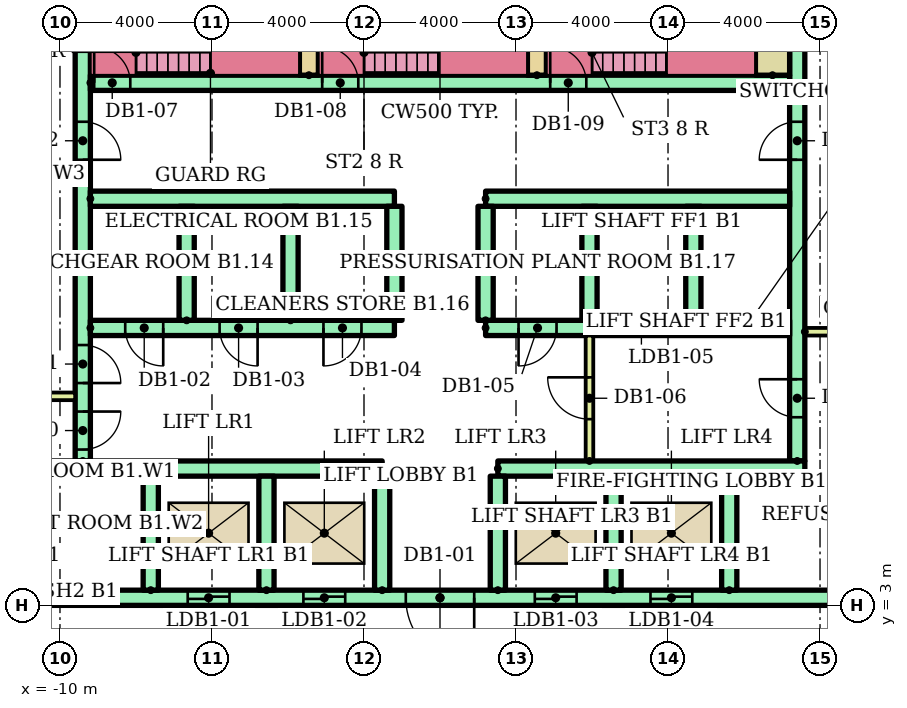
"""IFC4 building model, lengths in metres.
Left out: names, types, materials, properties, quantities, classifications, styles, units other than length and angle.
Written with IfcOpenShell. Run it as: python <this file> out.ifc"""

import sys

from ifc_helpers import new_model, si_unit, direction, frame, frame_2d, origin, place, context, subcontext, project, spatial, rectangle, extrude, element, fill, save


model = new_model("IFC4")
c1 = context("Model", 3, precision=1e-05, world=origin(), true_north=direction((0.0, 1.0)))
c2 = subcontext(c1, "Body", "Model", "MODEL_VIEW")
j1 = project(units=[si_unit("LENGTHUNIT", "METRE"), si_unit("PLANEANGLEUNIT", "RADIAN")], contexts=[c1])
p1 = place(None, origin())
s1 = spatial("IfcSite", under=j1, at=p1, CompositionType="ELEMENT")
p2 = place(p1, origin())
s2 = spatial("IfcBuilding", under=s1, at=p2, CompositionType="ELEMENT")
p3 = place(p2, frame((0.0, 0.0, -5.0)))
s3 = spatial("IfcBuildingStorey", under=s2, at=p3, CompositionType="ELEMENT", Elevation=-5.0)
p4 = place(p3, frame((-9.4, 6.8, 0.0), z_axis=(0.0, 0.0, 1.0), x_axis=(0.0, 1.0, 0.0)))
e1 = element("IfcWall", 1, at=p4, inside=s3, PredefinedType="SHEAR", context=c2, shape_type="SweptSolid", body=[
    extrude(rectangle(XDim=12.7, YDim=0.4, at=frame_2d((6.35, 0.0))), origin(), (0.0, 0.0, 1.0), 4.58),
])
p5 = place(p4, frame((0.3, 0.0, 0.0)))
e2 = element("IfcOpeningElement", 2, at=p5, cuts=e1, PredefinedType="OPENING", context=c2, shape_type="SweptSolid", body=[
    extrude(rectangle(XDim=1.0, YDim=2.1, at=frame_2d((0.5, 1.05))), frame((0.0, 0.21, 0.0), z_axis=(0.0, -1.0, 0.0), x_axis=(1.0, 0.0, 0.0)), (0.0, 0.0, 1.0), 0.42),
])
p6 = place(p4, frame((2.05, 0.0, 0.0)))
e3 = element("IfcOpeningElement", 3, at=p6, cuts=e1, PredefinedType="OPENING", context=c2, shape_type="SweptSolid", body=[
    extrude(rectangle(XDim=1.0, YDim=2.1, at=frame_2d((0.5, 1.05))), frame((0.0, 0.21, 0.0), z_axis=(0.0, -1.0, 0.0), x_axis=(1.0, 0.0, 0.0)), (0.0, 0.0, 1.0), 0.42),
])
p7 = place(p4, frame((7.925, 0.0, 0.0)))
e4 = element("IfcOpeningElement", 4, at=p7, cuts=e1, PredefinedType="OPENING", context=c2, shape_type="SweptSolid", body=[
    extrude(rectangle(XDim=1.0, YDim=2.1, at=frame_2d((0.5, 1.05))), frame((0.0, 0.21, 0.0), z_axis=(0.0, -1.0, 0.0), x_axis=(1.0, 0.0, 0.0)), (0.0, 0.0, 1.0), 0.42),
])
p8 = place(p3, frame((9.4, 6.8, 0.0), z_axis=(0.0, 0.0, 1.0), x_axis=(0.0, 1.0, 0.0)))
e5 = element("IfcWall", 5, at=p8, inside=s3, PredefinedType="SHEAR", context=c2, shape_type="SweptSolid", body=[
    extrude(rectangle(XDim=12.7, YDim=0.4, at=frame_2d((6.35, 0.0))), origin(), (0.0, 0.0, 1.0), 4.58),
])
p9 = place(p8, frame((1.15, 0.0, 0.0)))
e6 = element("IfcOpeningElement", 6, at=p9, cuts=e5, PredefinedType="OPENING", context=c2, shape_type="SweptSolid", body=[
    extrude(rectangle(XDim=1.0, YDim=2.1, at=frame_2d((0.5, 1.05))), frame((0.0, 0.21, 0.0), z_axis=(0.0, -1.0, 0.0), x_axis=(1.0, 0.0, 0.0)), (0.0, 0.0, 1.0), 0.42),
])
p10 = place(p8, frame((7.925, 0.0, 0.0)))
e7 = element("IfcOpeningElement", 7, at=p10, cuts=e5, PredefinedType="OPENING", context=c2, shape_type="SweptSolid", body=[
    extrude(rectangle(XDim=1.0, YDim=2.1, at=frame_2d((0.5, 1.05))), frame((0.0, 0.21, 0.0), z_axis=(0.0, -1.0, 0.0), x_axis=(1.0, 0.0, 0.0)), (0.0, 0.0, 1.0), 0.42),
])
p11 = place(p3, frame((-13.5, 3.2, 0.0)))
e8 = element("IfcWall", 8, at=p11, inside=s3, PredefinedType="SHEAR", context=c2, shape_type="SweptSolid", body=[
    extrude(rectangle(XDim=27.0, YDim=0.4, at=frame_2d((13.5, 0.0))), origin(), (0.0, 0.0, 1.0), 4.58),
])
p12 = place(p11, frame((6.861, 0.0, 0.0)))
e9 = element("IfcOpeningElement", 9, at=p12, cuts=e8, PredefinedType="OPENING", context=c2, shape_type="SweptSolid", body=[
    extrude(rectangle(XDim=1.1, YDim=2.1, at=frame_2d((0.55, 1.05))), frame((0.0, 0.21, 0.0), z_axis=(0.0, -1.0, 0.0), x_axis=(1.0, 0.0, 0.0)), (0.0, 0.0, 1.0), 0.42),
])
p13 = place(p11, frame((9.906, 0.0, 0.0)))
e10 = element("IfcOpeningElement", 10, at=p13, cuts=e8, PredefinedType="OPENING", context=c2, shape_type="SweptSolid", body=[
    extrude(rectangle(XDim=1.1, YDim=2.1, at=frame_2d((0.55, 1.05))), frame((0.0, 0.21, 0.0), z_axis=(0.0, -1.0, 0.0), x_axis=(1.0, 0.0, 0.0)), (0.0, 0.0, 1.0), 0.42),
])
p14 = place(p11, frame((15.994, 0.0, 0.0)))
e11 = element("IfcOpeningElement", 11, at=p14, cuts=e8, PredefinedType="OPENING", context=c2, shape_type="SweptSolid", body=[
    extrude(rectangle(XDim=1.1, YDim=2.1, at=frame_2d((0.55, 1.05))), frame((0.0, 0.21, 0.0), z_axis=(0.0, -1.0, 0.0), x_axis=(1.0, 0.0, 0.0)), (0.0, 0.0, 1.0), 0.42),
])
p15 = place(p11, frame((19.039, 0.0, 0.0)))
e12 = element("IfcOpeningElement", 12, at=p15, cuts=e8, PredefinedType="OPENING", context=c2, shape_type="SweptSolid", body=[
    extrude(rectangle(XDim=1.1, YDim=2.1, at=frame_2d((0.55, 1.05))), frame((0.0, 0.21, 0.0), z_axis=(0.0, -1.0, 0.0), x_axis=(1.0, 0.0, 0.0)), (0.0, 0.0, 1.0), 0.42),
])
p16 = place(p11, frame((12.6, 0.0, 0.0)))
e13 = element("IfcOpeningElement", 13, at=p16, cuts=e8, PredefinedType="OPENING", context=c2, shape_type="SweptSolid", body=[
    extrude(rectangle(XDim=1.8, YDim=2.1, at=frame_2d((0.9, 1.05))), frame((0.0, 0.21, 0.0), z_axis=(0.0, -1.0, 0.0), x_axis=(1.0, 0.0, 0.0)), (0.0, 0.0, 1.0), 0.42),
])
p17 = place(p3, frame((-13.5, 6.6, 0.0)))
e14 = element("IfcWall", 14, at=p17, inside=s3, PredefinedType="SHEAR", context=c2, shape_type="SweptSolid", body=[
    extrude(rectangle(XDim=11.978, YDim=0.4, at=frame_2d((5.989, 0.0))), origin(), (0.0, 0.0, 1.0), 4.58),
])
p18 = place(p3, frame((1.522, 6.6, 0.0)))
e15 = element("IfcWall", 15, at=p18, inside=s3, PredefinedType="SHEAR", context=c2, shape_type="SweptSolid", body=[
    extrude(rectangle(XDim=8.078, YDim=0.4, at=frame_2d((4.039, 0.0))), origin(), (0.0, 0.0, 1.0), 4.58),
])
for number, where, z_axis, x_axis in (
    (16, (-7.611, 3.4, 0.0), (0.0, 0.0, 1.0), (0.0, 1.0, 0.0)),
    (17, (-4.567, 3.4, 0.0), (0.0, 0.0, 1.0), (0.0, 1.0, 0.0)),
    (18, (-1.522, 3.4, 0.0), (0.0, 0.0, 1.0), (0.0, 1.0, 0.0)),
    (19, (1.522, 3.4, 0.0), (0.0, 0.0, 1.0), (0.0, 1.0, 0.0)),
    (20, (4.567, 3.4, 0.0), (0.0, 0.0, 1.0), (0.0, 1.0, 0.0)),
    (21, (7.611, 3.4, 0.0), (0.0, 0.0, 1.0), (0.0, 1.0, 0.0)),
):
    element("IfcWall", number, at=place(p3, frame(where, z_axis=z_axis, x_axis=x_axis)), inside=s3, PredefinedType="SHEAR", context=c2, shape_type="SweptSolid", body=[
        extrude(rectangle(XDim=3.0, YDim=0.4, at=frame_2d((1.5, 0.0))), origin(), (0.0, 0.0, 1.0), 4.58),
    ])
p19 = place(p3, frame((-9.2, 10.3, 0.0)))
e22 = element("IfcWall", 22, at=p19, inside=s3, PredefinedType="SHEAR", context=c2, shape_type="SweptSolid", body=[
    extrude(rectangle(XDim=8.0, YDim=0.4, at=frame_2d((4.0, 0.0))), origin(), (0.0, 0.0, 1.0), 4.58),
])
p20 = place(p19, frame((0.917, 0.0, 0.0)))
e23 = element("IfcOpeningElement", 23, at=p20, cuts=e22, PredefinedType="OPENING", context=c2, shape_type="SweptSolid", body=[
    extrude(rectangle(XDim=1.0, YDim=2.1, at=frame_2d((0.5, 1.05))), frame((0.0, 0.21, 0.0), z_axis=(0.0, -1.0, 0.0), x_axis=(1.0, 0.0, 0.0)), (0.0, 0.0, 1.0), 0.42),
])
p21 = place(p19, frame((3.4, 0.0, 0.0)))
e24 = element("IfcOpeningElement", 24, at=p21, cuts=e22, PredefinedType="OPENING", context=c2, shape_type="SweptSolid", body=[
    extrude(rectangle(XDim=1.0, YDim=2.1, at=frame_2d((0.5, 1.05))), frame((0.0, 0.21, 0.0), z_axis=(0.0, -1.0, 0.0), x_axis=(1.0, 0.0, 0.0)), (0.0, 0.0, 1.0), 0.42),
])
p22 = place(p19, frame((6.133, 0.0, 0.0)))
e25 = element("IfcOpeningElement", 25, at=p22, cuts=e22, PredefinedType="OPENING", context=c2, shape_type="SweptSolid", body=[
    extrude(rectangle(XDim=1.0, YDim=2.1, at=frame_2d((0.5, 1.05))), frame((0.0, 0.21, 0.0), z_axis=(0.0, -1.0, 0.0), x_axis=(1.0, 0.0, 0.0)), (0.0, 0.0, 1.0), 0.42),
])
p23 = place(p3, frame((-9.2, 13.7, 0.0)))
e26 = element("IfcWall", 26, at=p23, inside=s3, PredefinedType="SHEAR", context=c2, shape_type="SweptSolid", body=[
    extrude(rectangle(XDim=8.0, YDim=0.4, at=frame_2d((4.0, 0.0))), origin(), (0.0, 0.0, 1.0), 4.58),
])
p24 = place(p3, frame((1.2, 10.3, 0.0)))
e27 = element("IfcWall", 27, at=p24, inside=s3, PredefinedType="SHEAR", context=c2, shape_type="SweptSolid", body=[
    extrude(rectangle(XDim=8.0, YDim=0.4, at=frame_2d((4.0, 0.0))), origin(), (0.0, 0.0, 1.0), 4.58),
])
p25 = place(p24, frame((3.55, 0.0, 0.0)))
e28 = element("IfcOpeningElement", 28, at=p25, cuts=e27, PredefinedType="OPENING", context=c2, shape_type="SweptSolid", body=[
    extrude(rectangle(XDim=1.1, YDim=2.1, at=frame_2d((0.55, 1.05))), frame((0.0, 0.21, 0.0), z_axis=(0.0, -1.0, 0.0), x_axis=(1.0, 0.0, 0.0)), (0.0, 0.0, 1.0), 0.42),
])
p26 = place(p24, frame((6.283, 0.0, 0.0)))
e29 = element("IfcOpeningElement", 29, at=p26, cuts=e27, PredefinedType="OPENING", context=c2, shape_type="SweptSolid", body=[
    extrude(rectangle(XDim=1.1, YDim=2.1, at=frame_2d((0.55, 1.05))), frame((0.0, 0.21, 0.0), z_axis=(0.0, -1.0, 0.0), x_axis=(1.0, 0.0, 0.0)), (0.0, 0.0, 1.0), 0.42),
])
p27 = place(p24, frame((0.867, 0.0, 0.0)))
e30 = element("IfcOpeningElement", 30, at=p27, cuts=e27, PredefinedType="OPENING", context=c2, shape_type="SweptSolid", body=[
    extrude(rectangle(XDim=1.0, YDim=2.1, at=frame_2d((0.5, 1.05))), frame((0.0, 0.21, 0.0), z_axis=(0.0, -1.0, 0.0), x_axis=(1.0, 0.0, 0.0)), (0.0, 0.0, 1.0), 0.42),
])
p28 = place(p3, frame((1.2, 13.7, 0.0)))
e31 = element("IfcWall", 31, at=p28, inside=s3, PredefinedType="SHEAR", context=c2, shape_type="SweptSolid", body=[
    extrude(rectangle(XDim=8.0, YDim=0.4, at=frame_2d((4.0, 0.0))), origin(), (0.0, 0.0, 1.0), 4.58),
])
for number, where, z_axis, x_axis in (
    (32, (-6.667, 10.5, 0.0), (0.0, 0.0, 1.0), (0.0, 1.0, 0.0)),
    (33, (-3.933, 10.5, 0.0), (0.0, 0.0, 1.0), (0.0, 1.0, 0.0)),
    (34, (-1.2, 10.5, 0.0), (0.0, 0.0, 1.0), (0.0, 1.0, 0.0)),
    (35, (1.2, 10.5, 0.0), (0.0, 0.0, 1.0), (0.0, 1.0, 0.0)),
    (36, (3.933, 10.5, 0.0), (0.0, 0.0, 1.0), (0.0, 1.0, 0.0)),
    (37, (6.667, 10.5, 0.0), (0.0, 0.0, 1.0), (0.0, 1.0, 0.0)),
):
    element("IfcWall", number, at=place(p3, frame(where, z_axis=z_axis, x_axis=x_axis)), inside=s3, PredefinedType="SHEAR", context=c2, shape_type="SweptSolid", body=[
        extrude(rectangle(XDim=3.0, YDim=0.4, at=frame_2d((1.5, 0.0))), origin(), (0.0, 0.0, 1.0), 4.58),
    ])
p29 = place(p3, frame((3.933, 6.8, 0.0), z_axis=(0.0, 0.0, 1.0), x_axis=(0.0, 1.0, 0.0)))
e38 = element("IfcWall", 38, at=p29, inside=s3, PredefinedType="PARTITIONING", context=c2, shape_type="SweptSolid", body=[
    extrude(rectangle(XDim=3.3, YDim=0.2, at=frame_2d((1.65, 0.0))), origin(), (0.0, 0.0, 1.0), 4.58),
])
p30 = place(p29, frame((1.1, 0.0, 0.0)))
e39 = element("IfcOpeningElement", 39, at=p30, cuts=e38, PredefinedType="OPENING", context=c2, shape_type="SweptSolid", body=[
    extrude(rectangle(XDim=1.1, YDim=2.1, at=frame_2d((0.55, 1.05))), frame((0.0, 0.11, 0.0), z_axis=(0.0, -1.0, 0.0), x_axis=(1.0, 0.0, 0.0)), (0.0, 0.0, 1.0), 0.22),
])
p31 = place(p3, frame((-9.2, 16.75, 0.0)))
e40 = element("IfcWall", 40, at=p31, inside=s3, PredefinedType="SHEAR", context=c2, shape_type="SweptSolid", body=[
    extrude(rectangle(XDim=18.4, YDim=0.4, at=frame_2d((9.2, 0.0))), origin(), (0.0, 0.0, 1.0), 4.58),
])
p32 = place(p31, frame((0.1, 0.0, 0.0)))
e41 = element("IfcOpeningElement", 41, at=p32, cuts=e40, PredefinedType="OPENING", context=c2, shape_type="SweptSolid", body=[
    extrude(rectangle(XDim=0.95, YDim=2.1, at=frame_2d((0.475, 1.05))), frame((0.0, 0.21, 0.0), z_axis=(0.0, -1.0, 0.0), x_axis=(1.0, 0.0, 0.0)), (0.0, 0.0, 1.0), 0.42),
])
p33 = place(p31, frame((6.1, 0.0, 0.0)))
e42 = element("IfcOpeningElement", 42, at=p33, cuts=e40, PredefinedType="OPENING", context=c2, shape_type="SweptSolid", body=[
    extrude(rectangle(XDim=0.95, YDim=2.1, at=frame_2d((0.475, 1.05))), frame((0.0, 0.21, 0.0), z_axis=(0.0, -1.0, 0.0), x_axis=(1.0, 0.0, 0.0)), (0.0, 0.0, 1.0), 0.42),
])
p34 = place(p31, frame((12.1, 0.0, 0.0)))
e43 = element("IfcOpeningElement", 43, at=p34, cuts=e40, PredefinedType="OPENING", context=c2, shape_type="SweptSolid", body=[
    extrude(rectangle(XDim=0.95, YDim=2.1, at=frame_2d((0.475, 1.05))), frame((0.0, 0.21, 0.0), z_axis=(0.0, -1.0, 0.0), x_axis=(1.0, 0.0, 0.0)), (0.0, 0.0, 1.0), 0.42),
])
for number, where, z_axis, x_axis in (
    (44, (-3.45, 16.95, 0.0), (0.0, 0.0, 1.0), (0.0, 1.0, 0.0)),
    (45, (2.55, 16.95, 0.0), (0.0, 0.0, 1.0), (0.0, 1.0, 0.0)),
):
    element("IfcWall", number, at=place(p3, frame(where, z_axis=z_axis, x_axis=x_axis)), inside=s3, PredefinedType="SHEAR", context=c2, shape_type="SweptSolid", body=[
        extrude(rectangle(XDim=2.55, YDim=0.5, at=frame_2d((1.275, 0.0))), origin(), (0.0, 0.0, 1.0), 4.58),
    ])
p35 = place(p3, frame((8.75, 16.95, 0.0), z_axis=(0.0, 0.0, 1.0), x_axis=(0.0, 1.0, 0.0)))
e46 = element("IfcWall", 46, at=p35, inside=s3, PredefinedType="SHEAR", context=c2, shape_type="SweptSolid", body=[
    extrude(rectangle(XDim=2.55, YDim=0.9, at=frame_2d((1.275, 0.0))), origin(), (0.0, 0.0, 1.0), 4.58),
])
for number, where in (
    (47, (-13.5, 8.5, 0.0)),
    (48, (-13.5, 12.2, 0.0)),
    (49, (9.6, 10.2, 0.0)),
):
    element("IfcWall", number, at=place(p3, frame(where)), inside=s3, PredefinedType="PARTITIONING", context=c2, shape_type="SweptSolid", body=[
        extrude(rectangle(XDim=3.9, YDim=0.2, at=frame_2d((1.95, 0.0))), origin(), (0.0, 0.0, 1.0), 4.58),
    ])
p36 = place(p12, origin())
e50 = element("IfcDoor", 50, at=p36, inside=s3, OperationType="SLIDING_TO_LEFT", PredefinedType="DOOR", context=c2, shape_type="SweptSolid", body=[
    extrude(rectangle(XDim=1.1, YDim=2.1, at=frame_2d((0.55, 1.05))), frame((0.0, 0.025, 0.0), z_axis=(0.0, -1.0, 0.0), x_axis=(1.0, 0.0, 0.0)), (0.0, 0.0, 1.0), 0.05),
])
fill(e9, e50)
p37 = place(p13, origin())
e51 = element("IfcDoor", 51, at=p37, inside=s3, OperationType="SLIDING_TO_LEFT", PredefinedType="DOOR", context=c2, shape_type="SweptSolid", body=[
    extrude(rectangle(XDim=1.1, YDim=2.1, at=frame_2d((0.55, 1.05))), frame((0.0, 0.025, 0.0), z_axis=(0.0, -1.0, 0.0), x_axis=(1.0, 0.0, 0.0)), (0.0, 0.0, 1.0), 0.05),
])
fill(e10, e51)
p38 = place(p14, origin())
e52 = element("IfcDoor", 52, at=p38, inside=s3, OperationType="SLIDING_TO_LEFT", PredefinedType="DOOR", context=c2, shape_type="SweptSolid", body=[
    extrude(rectangle(XDim=1.1, YDim=2.1, at=frame_2d((0.55, 1.05))), frame((0.0, 0.025, 0.0), z_axis=(0.0, -1.0, 0.0), x_axis=(1.0, 0.0, 0.0)), (0.0, 0.0, 1.0), 0.05),
])
fill(e11, e52)
p39 = place(p15, origin())
e53 = element("IfcDoor", 53, at=p39, inside=s3, OperationType="SLIDING_TO_LEFT", PredefinedType="DOOR", context=c2, shape_type="SweptSolid", body=[
    extrude(rectangle(XDim=1.1, YDim=2.1, at=frame_2d((0.55, 1.05))), frame((0.0, 0.025, 0.0), z_axis=(0.0, -1.0, 0.0), x_axis=(1.0, 0.0, 0.0)), (0.0, 0.0, 1.0), 0.05),
])
fill(e12, e53)
p40 = place(p16, frame((1.8, 0.0, 0.0), z_axis=(0.0, 0.0, 1.0), x_axis=(-1.0, 0.0, 0.0)))
e54 = element("IfcDoor", 54, at=p40, inside=s3, OperationType="DOUBLE_DOOR_SINGLE_SWING", PredefinedType="DOOR", context=c2, shape_type="SweptSolid", body=[
    extrude(rectangle(XDim=1.8, YDim=2.1, at=frame_2d((0.9, 1.05))), frame((0.0, 0.025, 0.0), z_axis=(0.0, -1.0, 0.0), x_axis=(1.0, 0.0, 0.0)), (0.0, 0.0, 1.0), 0.05),
])
fill(e13, e54)
p41 = place(p25, origin())
e55 = element("IfcDoor", 55, at=p41, inside=s3, OperationType="SLIDING_TO_LEFT", PredefinedType="DOOR", context=c2, shape_type="SweptSolid", body=[
    extrude(rectangle(XDim=1.1, YDim=2.1, at=frame_2d((0.55, 1.05))), frame((0.0, 0.025, 0.0), z_axis=(0.0, -1.0, 0.0), x_axis=(1.0, 0.0, 0.0)), (0.0, 0.0, 1.0), 0.05),
])
fill(e28, e55)
p42 = place(p26, origin())
e56 = element("IfcDoor", 56, at=p42, inside=s3, OperationType="SLIDING_TO_LEFT", PredefinedType="DOOR", context=c2, shape_type="SweptSolid", body=[
    extrude(rectangle(XDim=1.1, YDim=2.1, at=frame_2d((0.55, 1.05))), frame((0.0, 0.025, 0.0), z_axis=(0.0, -1.0, 0.0), x_axis=(1.0, 0.0, 0.0)), (0.0, 0.0, 1.0), 0.05),
])
fill(e29, e56)
p43 = place(p20, frame((1.0, 0.0, 0.0), z_axis=(0.0, 0.0, 1.0), x_axis=(-1.0, 0.0, 0.0)))
e57 = element("IfcDoor", 57, at=p43, inside=s3, OperationType="SINGLE_SWING_RIGHT", PredefinedType="DOOR", context=c2, shape_type="SweptSolid", body=[
    extrude(rectangle(XDim=1.0, YDim=2.1, at=frame_2d((0.5, 1.05))), frame((0.0, 0.025, 0.0), z_axis=(0.0, -1.0, 0.0), x_axis=(1.0, 0.0, 0.0)), (0.0, 0.0, 1.0), 0.05),
])
fill(e23, e57)
p44 = place(p21, frame((1.0, 0.0, 0.0), z_axis=(0.0, 0.0, 1.0), x_axis=(-1.0, 0.0, 0.0)))
e58 = element("IfcDoor", 58, at=p44, inside=s3, OperationType="SINGLE_SWING_RIGHT", PredefinedType="DOOR", context=c2, shape_type="SweptSolid", body=[
    extrude(rectangle(XDim=1.0, YDim=2.1, at=frame_2d((0.5, 1.05))), frame((0.0, 0.025, 0.0), z_axis=(0.0, -1.0, 0.0), x_axis=(1.0, 0.0, 0.0)), (0.0, 0.0, 1.0), 0.05),
])
fill(e24, e58)
p45 = place(p22, frame((1.0, 0.0, 0.0), z_axis=(0.0, 0.0, 1.0), x_axis=(-1.0, 0.0, 0.0)))
e59 = element("IfcDoor", 59, at=p45, inside=s3, OperationType="SINGLE_SWING_LEFT", PredefinedType="DOOR", context=c2, shape_type="SweptSolid", body=[
    extrude(rectangle(XDim=1.0, YDim=2.1, at=frame_2d((0.5, 1.05))), frame((0.0, 0.025, 0.0), z_axis=(0.0, -1.0, 0.0), x_axis=(1.0, 0.0, 0.0)), (0.0, 0.0, 1.0), 0.05),
])
fill(e25, e59)
p46 = place(p27, frame((1.0, 0.0, 0.0), z_axis=(0.0, 0.0, 1.0), x_axis=(-1.0, 0.0, 0.0)))
e60 = element("IfcDoor", 60, at=p46, inside=s3, OperationType="SINGLE_SWING_LEFT", PredefinedType="DOOR", context=c2, shape_type="SweptSolid", body=[
    extrude(rectangle(XDim=1.0, YDim=2.1, at=frame_2d((0.5, 1.05))), frame((0.0, 0.025, 0.0), z_axis=(0.0, -1.0, 0.0), x_axis=(1.0, 0.0, 0.0)), (0.0, 0.0, 1.0), 0.05),
])
fill(e30, e60)
p47 = place(p30, origin())
e61 = element("IfcDoor", 61, at=p47, inside=s3, OperationType="SINGLE_SWING_RIGHT", PredefinedType="DOOR", context=c2, shape_type="SweptSolid", body=[
    extrude(rectangle(XDim=1.1, YDim=2.1, at=frame_2d((0.55, 1.05))), frame((0.0, 0.025, 0.0), z_axis=(0.0, -1.0, 0.0), x_axis=(1.0, 0.0, 0.0)), (0.0, 0.0, 1.0), 0.05),
])
fill(e39, e61)
p48 = place(p32, origin())
e62 = element("IfcDoor", 62, at=p48, inside=s3, OperationType="SINGLE_SWING_LEFT", PredefinedType="DOOR", context=c2, shape_type="SweptSolid", body=[
    extrude(rectangle(XDim=0.95, YDim=2.1, at=frame_2d((0.475, 1.05))), frame((0.0, 0.025, 0.0), z_axis=(0.0, -1.0, 0.0), x_axis=(1.0, 0.0, 0.0)), (0.0, 0.0, 1.0), 0.05),
])
fill(e41, e62)
p49 = place(p33, origin())
e63 = element("IfcDoor", 63, at=p49, inside=s3, OperationType="SINGLE_SWING_LEFT", PredefinedType="DOOR", context=c2, shape_type="SweptSolid", body=[
    extrude(rectangle(XDim=0.95, YDim=2.1, at=frame_2d((0.475, 1.05))), frame((0.0, 0.025, 0.0), z_axis=(0.0, -1.0, 0.0), x_axis=(1.0, 0.0, 0.0)), (0.0, 0.0, 1.0), 0.05),
])
fill(e42, e63)
p50 = place(p34, origin())
e64 = element("IfcDoor", 64, at=p50, inside=s3, OperationType="SINGLE_SWING_LEFT", PredefinedType="DOOR", context=c2, shape_type="SweptSolid", body=[
    extrude(rectangle(XDim=0.95, YDim=2.1, at=frame_2d((0.475, 1.05))), frame((0.0, 0.025, 0.0), z_axis=(0.0, -1.0, 0.0), x_axis=(1.0, 0.0, 0.0)), (0.0, 0.0, 1.0), 0.05),
])
fill(e43, e64)
p51 = place(p5, frame((1.0, 0.0, 0.0), z_axis=(0.0, 0.0, 1.0), x_axis=(-1.0, 0.0, 0.0)))
e65 = element("IfcDoor", 65, at=p51, inside=s3, OperationType="SINGLE_SWING_RIGHT", PredefinedType="DOOR", context=c2, shape_type="SweptSolid", body=[
    extrude(rectangle(XDim=1.0, YDim=2.1, at=frame_2d((0.5, 1.05))), frame((0.0, 0.025, 0.0), z_axis=(0.0, -1.0, 0.0), x_axis=(1.0, 0.0, 0.0)), (0.0, 0.0, 1.0), 0.05),
])
fill(e2, e65)
p52 = place(p6, frame((1.0, 0.0, 0.0), z_axis=(0.0, 0.0, 1.0), x_axis=(-1.0, 0.0, 0.0)))
e66 = element("IfcDoor", 66, at=p52, inside=s3, OperationType="SINGLE_SWING_LEFT", PredefinedType="DOOR", context=c2, shape_type="SweptSolid", body=[
    extrude(rectangle(XDim=1.0, YDim=2.1, at=frame_2d((0.5, 1.05))), frame((0.0, 0.025, 0.0), z_axis=(0.0, -1.0, 0.0), x_axis=(1.0, 0.0, 0.0)), (0.0, 0.0, 1.0), 0.05),
])
fill(e3, e66)
p53 = place(p7, frame((1.0, 0.0, 0.0), z_axis=(0.0, 0.0, 1.0), x_axis=(-1.0, 0.0, 0.0)))
e67 = element("IfcDoor", 67, at=p53, inside=s3, OperationType="SINGLE_SWING_LEFT", PredefinedType="DOOR", context=c2, shape_type="SweptSolid", body=[
    extrude(rectangle(XDim=1.0, YDim=2.1, at=frame_2d((0.5, 1.05))), frame((0.0, 0.025, 0.0), z_axis=(0.0, -1.0, 0.0), x_axis=(1.0, 0.0, 0.0)), (0.0, 0.0, 1.0), 0.05),
])
fill(e4, e67)
p54 = place(p9, origin())
e68 = element("IfcDoor", 68, at=p54, inside=s3, OperationType="SINGLE_SWING_RIGHT", PredefinedType="DOOR", context=c2, shape_type="SweptSolid", body=[
    extrude(rectangle(XDim=1.0, YDim=2.1, at=frame_2d((0.5, 1.05))), frame((0.0, 0.025, 0.0), z_axis=(0.0, -1.0, 0.0), x_axis=(1.0, 0.0, 0.0)), (0.0, 0.0, 1.0), 0.05),
])
fill(e6, e68)
p55 = place(p10, origin())
e69 = element("IfcDoor", 69, at=p55, inside=s3, OperationType="SINGLE_SWING_LEFT", PredefinedType="DOOR", context=c2, shape_type="SweptSolid", body=[
    extrude(rectangle(XDim=1.0, YDim=2.1, at=frame_2d((0.5, 1.05))), frame((0.0, 0.025, 0.0), z_axis=(0.0, -1.0, 0.0), x_axis=(1.0, 0.0, 0.0)), (0.0, 0.0, 1.0), 0.05),
])
fill(e7, e69)
save(model, sys.argv[1])
